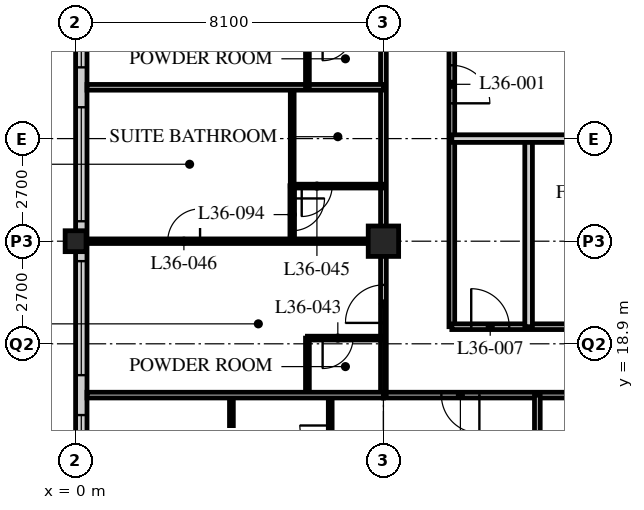
"""IFC4 building model, lengths in metres.
Left out: names, types, materials, properties, quantities, classifications, styles, units other than length and angle.
Written with IfcOpenShell. Run it as: python <this file> out.ifc"""

import sys

from ifc_helpers import new_model, si_unit, direction, frame, frame_2d, origin, origin_2d, place, context, subcontext, project, spatial, rectangle, hollow_rectangle, extrude, element, fill, save


model = new_model("IFC4")
c1 = context("Model", 3, precision=1e-05, world=origin(), true_north=direction((0.0, 1.0)))
c2 = subcontext(c1, "Body", "Model", "MODEL_VIEW")
j1 = project(units=[si_unit("LENGTHUNIT", "METRE"), si_unit("PLANEANGLEUNIT", "RADIAN")], contexts=[c1])
p1 = place(None, origin())
s1 = spatial("IfcSite", under=j1, at=p1, CompositionType="ELEMENT")
p2 = place(p1, origin())
s2 = spatial("IfcBuilding", under=s1, at=p2, CompositionType="ELEMENT")
p3 = place(p2, frame((0.0, 0.0, 140.8)))
s3 = spatial("IfcBuildingStorey", under=s2, at=p3, CompositionType="ELEMENT", Elevation=140.8)
p4 = place(p3, frame((0.0, 21.6, 0.0), z_axis=(0.0, 0.0, 1.0), x_axis=(1.0, 0.0, 0.0)))
e1 = element("IfcColumn", 1, at=p4, inside=s3, PredefinedType="COLUMN", context=c2, shape_type="SweptSolid", body=[
    extrude(hollow_rectangle(XDim=0.55, YDim=0.55, WallThickness=0.04, at=origin_2d()), origin(), (0.0, 0.0, 1.0), 3.4),
])
p5 = place(p3, frame((8.1, 21.6, 0.0), z_axis=(0.0, 0.0, 1.0), x_axis=(1.0, 0.0, 0.0)))
e2 = element("IfcColumn", 2, at=p5, inside=s3, PredefinedType="COLUMN", context=c2, shape_type="SweptSolid", body=[
    extrude(hollow_rectangle(XDim=0.8, YDim=0.8, WallThickness=0.08, at=origin_2d()), origin(), (0.0, 0.0, 1.0), 3.4),
])
p6 = place(p3, frame((0.15, 45.6, 0.0), z_axis=(0.0, 0.0, 1.0), x_axis=(0.0, -1.0, 0.0)))
e3 = element("IfcWall", 3, at=p6, inside=s3, PredefinedType="SOLIDWALL", context=c2, shape_type="SweptSolid", body=[
    extrude(rectangle(XDim=32.1, YDim=0.3, at=frame_2d((16.05, 0.0))), origin(), (0.0, 0.0, 1.0), 3.19),
])
p7 = place(p6, frame((0.225, 0.0, 0.9)))
e4 = element("IfcOpeningElement", 4, at=p7, cuts=e3, PredefinedType="OPENING", context=c2, shape_type="SweptSolid", body=[
    extrude(rectangle(XDim=3.0, YDim=2.0, at=frame_2d((1.5, 1.0))), frame((0.0, 0.16, 0.0), z_axis=(0.0, -1.0, 0.0), x_axis=(1.0, 0.0, 0.0)), (0.0, 0.0, 1.0), 0.32),
])
p8 = place(p6, frame((4.275, 0.0, 0.9)))
e5 = element("IfcOpeningElement", 5, at=p8, cuts=e3, PredefinedType="OPENING", context=c2, shape_type="SweptSolid", body=[
    extrude(rectangle(XDim=3.0, YDim=2.0, at=frame_2d((1.5, 1.0))), frame((0.0, 0.16, 0.0), z_axis=(0.0, -1.0, 0.0), x_axis=(1.0, 0.0, 0.0)), (0.0, 0.0, 1.0), 0.32),
])
p9 = place(p6, frame((8.325, 0.0, 0.9)))
e6 = element("IfcOpeningElement", 6, at=p9, cuts=e3, PredefinedType="OPENING", context=c2, shape_type="SweptSolid", body=[
    extrude(rectangle(XDim=3.0, YDim=2.0, at=frame_2d((1.5, 1.0))), frame((0.0, 0.16, 0.0), z_axis=(0.0, -1.0, 0.0), x_axis=(1.0, 0.0, 0.0)), (0.0, 0.0, 1.0), 0.32),
])
p10 = place(p6, frame((12.375, 0.0, 0.9)))
e7 = element("IfcOpeningElement", 7, at=p10, cuts=e3, PredefinedType="OPENING", context=c2, shape_type="SweptSolid", body=[
    extrude(rectangle(XDim=3.0, YDim=2.0, at=frame_2d((1.5, 1.0))), frame((0.0, 0.16, 0.0), z_axis=(0.0, -1.0, 0.0), x_axis=(1.0, 0.0, 0.0)), (0.0, 0.0, 1.0), 0.32),
])
p11 = place(p6, frame((16.425, 0.0, 0.9)))
e8 = element("IfcOpeningElement", 8, at=p11, cuts=e3, PredefinedType="OPENING", context=c2, shape_type="SweptSolid", body=[
    extrude(rectangle(XDim=3.0, YDim=2.0, at=frame_2d((1.5, 1.0))), frame((0.0, 0.16, 0.0), z_axis=(0.0, -1.0, 0.0), x_axis=(1.0, 0.0, 0.0)), (0.0, 0.0, 1.0), 0.32),
])
p12 = place(p6, frame((20.475, 0.0, 0.9)))
e9 = element("IfcOpeningElement", 9, at=p12, cuts=e3, PredefinedType="OPENING", context=c2, shape_type="SweptSolid", body=[
    extrude(rectangle(XDim=3.0, YDim=2.0, at=frame_2d((1.5, 1.0))), frame((0.0, 0.16, 0.0), z_axis=(0.0, -1.0, 0.0), x_axis=(1.0, 0.0, 0.0)), (0.0, 0.0, 1.0), 0.32),
])
p13 = place(p6, frame((24.525, 0.0, 0.9)))
e10 = element("IfcOpeningElement", 10, at=p13, cuts=e3, PredefinedType="OPENING", context=c2, shape_type="SweptSolid", body=[
    extrude(rectangle(XDim=3.0, YDim=2.0, at=frame_2d((1.5, 1.0))), frame((0.0, 0.16, 0.0), z_axis=(0.0, -1.0, 0.0), x_axis=(1.0, 0.0, 0.0)), (0.0, 0.0, 1.0), 0.32),
])
p14 = place(p6, frame((28.575, 0.0, 0.9)))
e11 = element("IfcOpeningElement", 11, at=p14, cuts=e3, PredefinedType="OPENING", context=c2, shape_type="SweptSolid", body=[
    extrude(rectangle(XDim=3.0, YDim=2.0, at=frame_2d((1.5, 1.0))), frame((0.0, 0.16, 0.0), z_axis=(0.0, -1.0, 0.0), x_axis=(1.0, 0.0, 0.0)), (0.0, 0.0, 1.0), 0.32),
])
p15 = place(p3, frame((8.1, 17.55, 0.0), z_axis=(0.0, 0.0, 1.0), x_axis=(1.0, 0.0, 0.0)))
e12 = element("IfcWall", 12, at=p15, inside=s3, PredefinedType="PARTITIONING", context=c2, shape_type="SweptSolid", body=[
    extrude(rectangle(XDim=36.45, YDim=0.15, at=frame_2d((18.225, 0.0))), origin(), (0.0, 0.0, 1.0), 3.19),
])
p16 = place(p15, frame((9.625, 0.0, 0.0)))
e13 = element("IfcOpeningElement", 13, at=p16, cuts=e12, PredefinedType="OPENING", context=c2, shape_type="SweptSolid", body=[
    extrude(rectangle(XDim=1.0, YDim=2.1, at=frame_2d((0.5, 1.05))), frame((0.0, 0.085, 0.0), z_axis=(0.0, -1.0, 0.0), x_axis=(1.0, 0.0, 0.0)), (0.0, 0.0, 1.0), 0.17),
])
p17 = place(p15, frame((18.1, 0.0, 0.0)))
e14 = element("IfcOpeningElement", 14, at=p17, cuts=e12, PredefinedType="OPENING", context=c2, shape_type="SweptSolid", body=[
    extrude(rectangle(XDim=1.0, YDim=2.1, at=frame_2d((0.5, 1.05))), frame((0.0, 0.085, 0.0), z_axis=(0.0, -1.0, 0.0), x_axis=(1.0, 0.0, 0.0)), (0.0, 0.0, 1.0), 0.17),
])
p18 = place(p15, frame((26.75, 0.0, 0.0)))
e15 = element("IfcOpeningElement", 15, at=p18, cuts=e12, PredefinedType="OPENING", context=c2, shape_type="SweptSolid", body=[
    extrude(rectangle(XDim=1.0, YDim=2.1, at=frame_2d((0.5, 1.05))), frame((0.0, 0.085, 0.0), z_axis=(0.0, -1.0, 0.0), x_axis=(1.0, 0.0, 0.0)), (0.0, 0.0, 1.0), 0.17),
])
p19 = place(p15, frame((30.8, 0.0, 0.0)))
e16 = element("IfcOpeningElement", 16, at=p19, cuts=e12, PredefinedType="OPENING", context=c2, shape_type="SweptSolid", body=[
    extrude(rectangle(XDim=1.0, YDim=2.1, at=frame_2d((0.5, 1.05))), frame((0.0, 0.085, 0.0), z_axis=(0.0, -1.0, 0.0), x_axis=(1.0, 0.0, 0.0)), (0.0, 0.0, 1.0), 0.17),
])
p20 = place(p15, frame((1.525, 0.0, 0.0)))
e17 = element("IfcOpeningElement", 17, at=p20, cuts=e12, PredefinedType="OPENING", context=c2, shape_type="SweptSolid", body=[
    extrude(rectangle(XDim=1.0, YDim=2.1, at=frame_2d((0.5, 1.05))), frame((0.0, 0.085, 0.0), z_axis=(0.0, -1.0, 0.0), x_axis=(1.0, 0.0, 0.0)), (0.0, 0.0, 1.0), 0.17),
])
p21 = place(p15, frame((33.925, 0.0, 0.0)))
e18 = element("IfcOpeningElement", 18, at=p21, cuts=e12, PredefinedType="OPENING", context=c2, shape_type="SweptSolid", body=[
    extrude(rectangle(XDim=1.0, YDim=2.1, at=frame_2d((0.5, 1.05))), frame((0.0, 0.085, 0.0), z_axis=(0.0, -1.0, 0.0), x_axis=(1.0, 0.0, 0.0)), (0.0, 0.0, 1.0), 0.17),
])
p22 = place(p3, frame((8.1, 17.55, 0.0), z_axis=(0.0, 0.0, 1.0), x_axis=(0.0, 1.0, 0.0)))
e19 = element("IfcWall", 19, at=p22, inside=s3, PredefinedType="PARTITIONING", context=c2, shape_type="SweptSolid", body=[
    extrude(rectangle(XDim=28.35, YDim=0.15, at=frame_2d((14.175, 0.0))), origin(), (0.0, 0.0, 1.0), 2.578),
])
p23 = place(p22, frame((1.9, 0.0, 0.0)))
e20 = element("IfcOpeningElement", 20, at=p23, cuts=e19, PredefinedType="OPENING", context=c2, shape_type="SweptSolid", body=[
    extrude(rectangle(XDim=1.0, YDim=2.1, at=frame_2d((0.5, 1.05))), frame((0.0, 0.085, 0.0), z_axis=(0.0, -1.0, 0.0), x_axis=(1.0, 0.0, 0.0)), (0.0, 0.0, 1.0), 0.17),
])
p24 = place(p22, frame((10.0, 0.0, 0.0)))
e21 = element("IfcOpeningElement", 21, at=p24, cuts=e19, PredefinedType="OPENING", context=c2, shape_type="SweptSolid", body=[
    extrude(rectangle(XDim=1.0, YDim=2.1, at=frame_2d((0.5, 1.05))), frame((0.0, 0.085, 0.0), z_axis=(0.0, -1.0, 0.0), x_axis=(1.0, 0.0, 0.0)), (0.0, 0.0, 1.0), 0.17),
])
p25 = place(p22, frame((18.1, 0.0, 0.0)))
e22 = element("IfcOpeningElement", 22, at=p25, cuts=e19, PredefinedType="OPENING", context=c2, shape_type="SweptSolid", body=[
    extrude(rectangle(XDim=1.0, YDim=2.1, at=frame_2d((0.5, 1.05))), frame((0.0, 0.085, 0.0), z_axis=(0.0, -1.0, 0.0), x_axis=(1.0, 0.0, 0.0)), (0.0, 0.0, 1.0), 0.17),
])
p26 = place(p22, frame((24.9, 0.0, 0.0)))
e23 = element("IfcOpeningElement", 23, at=p26, cuts=e19, PredefinedType="OPENING", context=c2, shape_type="SweptSolid", body=[
    extrude(rectangle(XDim=1.0, YDim=2.1, at=frame_2d((0.5, 1.05))), frame((0.0, 0.085, 0.0), z_axis=(0.0, -1.0, 0.0), x_axis=(1.0, 0.0, 0.0)), (0.0, 0.0, 1.0), 0.17),
])
p27 = place(p3, frame((9.9, 44.1, 0.0), z_axis=(0.0, 0.0, 1.0), x_axis=(0.0, -1.0, 0.0)))
e24 = element("IfcWall", 24, at=p27, inside=s3, PredefinedType="PARTITIONING", context=c2, shape_type="SweptSolid", body=[
    extrude(rectangle(XDim=24.75, YDim=0.15, at=frame_2d((12.375, 0.0))), origin(), (0.0, 0.0, 1.0), 3.19),
])
p28 = place(p27, frame((17.871, 0.0, 0.0)))
e25 = element("IfcOpeningElement", 25, at=p28, cuts=e24, PredefinedType="OPENING", context=c2, shape_type="SweptSolid", body=[
    extrude(rectangle(XDim=1.0, YDim=2.1, at=frame_2d((0.5, 1.05))), frame((0.0, 0.085, 0.0), z_axis=(0.0, -1.0, 0.0), x_axis=(1.0, 0.0, 0.0)), (0.0, 0.0, 1.0), 0.17),
])
p29 = place(p27, frame((13.821, 0.0, 0.0)))
e26 = element("IfcOpeningElement", 26, at=p29, cuts=e24, PredefinedType="OPENING", context=c2, shape_type="SweptSolid", body=[
    extrude(rectangle(XDim=1.0, YDim=2.1, at=frame_2d((0.5, 1.05))), frame((0.0, 0.085, 0.0), z_axis=(0.0, -1.0, 0.0), x_axis=(1.0, 0.0, 0.0)), (0.0, 0.0, 1.0), 0.17),
])
p30 = place(p27, frame((10.4, 0.0, 0.0)))
e27 = element("IfcOpeningElement", 27, at=p30, cuts=e24, PredefinedType="OPENING", context=c2, shape_type="SweptSolid", body=[
    extrude(rectangle(XDim=1.0, YDim=2.1, at=frame_2d((0.5, 1.05))), frame((0.0, 0.085, 0.0), z_axis=(0.0, -1.0, 0.0), x_axis=(1.0, 0.0, 0.0)), (0.0, 0.0, 1.0), 0.17),
])
p31 = place(p27, frame((6.35, 0.0, 0.0)))
e28 = element("IfcOpeningElement", 28, at=p31, cuts=e24, PredefinedType="OPENING", context=c2, shape_type="SweptSolid", body=[
    extrude(rectangle(XDim=1.0, YDim=2.1, at=frame_2d((0.5, 1.05))), frame((0.0, 0.085, 0.0), z_axis=(0.0, -1.0, 0.0), x_axis=(1.0, 0.0, 0.0)), (0.0, 0.0, 1.0), 0.17),
])
p32 = place(p3, frame((9.9, 19.35, 0.0), z_axis=(0.0, 0.0, 1.0), x_axis=(1.0, 0.0, 0.0)))
e29 = element("IfcWall", 29, at=p32, inside=s3, PredefinedType="PARTITIONING", context=c2, shape_type="SweptSolid", body=[
    extrude(rectangle(XDim=17.24, YDim=0.15, at=frame_2d((8.62, 0.0))), origin(), (0.0, 0.0, 1.0), 3.19),
])
p33 = place(p32, frame((0.51, 0.0, 0.0)))
e30 = element("IfcOpeningElement", 30, at=p33, cuts=e29, PredefinedType="OPENING", context=c2, shape_type="SweptSolid", body=[
    extrude(rectangle(XDim=1.0, YDim=2.1, at=frame_2d((0.5, 1.05))), frame((0.0, 0.085, 0.0), z_axis=(0.0, -1.0, 0.0), x_axis=(1.0, 0.0, 0.0)), (0.0, 0.0, 1.0), 0.17),
])
p34 = place(p32, frame((3.66, 0.0, 0.0)))
e31 = element("IfcOpeningElement", 31, at=p34, cuts=e29, PredefinedType="OPENING", context=c2, shape_type="SweptSolid", body=[
    extrude(rectangle(XDim=1.0, YDim=2.1, at=frame_2d((0.5, 1.05))), frame((0.0, 0.085, 0.0), z_axis=(0.0, -1.0, 0.0), x_axis=(1.0, 0.0, 0.0)), (0.0, 0.0, 1.0), 0.17),
])
p35 = place(p32, frame((7.618, 0.0, 0.0)))
e32 = element("IfcOpeningElement", 32, at=p35, cuts=e29, PredefinedType="OPENING", context=c2, shape_type="SweptSolid", body=[
    extrude(rectangle(XDim=1.0, YDim=2.1, at=frame_2d((0.5, 1.05))), frame((0.0, 0.085, 0.0), z_axis=(0.0, -1.0, 0.0), x_axis=(1.0, 0.0, 0.0)), (0.0, 0.0, 1.0), 0.17),
])
p36 = place(p32, frame((13.093, 0.0, 0.0)))
e33 = element("IfcOpeningElement", 33, at=p36, cuts=e29, PredefinedType="OPENING", context=c2, shape_type="SweptSolid", body=[
    extrude(rectangle(XDim=1.0, YDim=2.1, at=frame_2d((0.5, 1.05))), frame((0.0, 0.085, 0.0), z_axis=(0.0, -1.0, 0.0), x_axis=(1.0, 0.0, 0.0)), (0.0, 0.0, 1.0), 0.17),
])
p37 = place(p3, frame((11.92, 19.35, 0.0), z_axis=(0.0, 0.0, 1.0), x_axis=(0.0, 1.0, 0.0)))
e34 = element("IfcWall", 34, at=p37, inside=s3, PredefinedType="SOLIDWALL", context=c2, shape_type="SweptSolid", body=[
    extrude(rectangle(XDim=4.95, YDim=0.2, at=frame_2d((2.475, 0.0))), origin(), (0.0, 0.0, 1.0), 3.19),
])
p38 = place(p3, frame((9.9, 24.3, 0.0), z_axis=(0.0, 0.0, 1.0), x_axis=(1.0, 0.0, 0.0)))
e35 = element("IfcWall", 35, at=p38, inside=s3, PredefinedType="SOLIDWALL", context=c2, shape_type="SweptSolid", body=[
    extrude(rectangle(XDim=6.3, YDim=0.2, at=frame_2d((3.15, 0.0))), origin(), (0.0, 0.0, 1.0), 3.19),
])
p39 = place(p3, frame((6.1, 17.55, 0.0), z_axis=(0.0, 0.0, 1.0), x_axis=(0.0, 1.0, 0.0)))
e36 = element("IfcWall", 36, at=p39, inside=s3, PredefinedType="PARTITIONING", context=c2, shape_type="SweptSolid", body=[
    extrude(rectangle(XDim=1.5, YDim=0.1, at=frame_2d((0.75, 0.0))), origin(), (0.0, 0.0, 1.0), 3.19),
])
p40 = place(p3, frame((8.1, 19.05, 0.0), z_axis=(0.0, 0.0, 1.0), x_axis=(-1.0, 0.0, 0.0)))
e37 = element("IfcWall", 37, at=p40, inside=s3, PredefinedType="PARTITIONING", context=c2, shape_type="SweptSolid", body=[
    extrude(rectangle(XDim=2.0, YDim=0.1, at=frame_2d((1.0, 0.0))), origin(), (0.0, 0.0, 1.0), 3.19),
])
p41 = place(p40, frame((0.8, 0.0, 0.0)))
e38 = element("IfcOpeningElement", 38, at=p41, cuts=e37, PredefinedType="OPENING", context=c2, shape_type="SweptSolid", body=[
    extrude(rectangle(XDim=0.8, YDim=2.1, at=frame_2d((0.4, 1.05))), frame((0.0, 0.06, 0.0), z_axis=(0.0, -1.0, 0.0), x_axis=(1.0, 0.0, 0.0)), (0.0, 0.0, 1.0), 0.12),
])
p42 = place(p3, frame((5.7, 23.05, 0.0), z_axis=(0.0, 0.0, 1.0), x_axis=(0.0, 1.0, 0.0)))
e39 = element("IfcWall", 39, at=p42, inside=s3, PredefinedType="PARTITIONING", context=c2, shape_type="SweptSolid", body=[
    extrude(rectangle(XDim=2.6, YDim=0.1, at=frame_2d((1.3, 0.0))), origin(), (0.0, 0.0, 1.0), 3.19),
])
p43 = place(p3, frame((8.1, 23.05, 0.0), z_axis=(0.0, 0.0, 1.0), x_axis=(-1.0, 0.0, 0.0)))
e40 = element("IfcWall", 40, at=p43, inside=s3, PredefinedType="PARTITIONING", context=c2, shape_type="SweptSolid", body=[
    extrude(rectangle(XDim=2.4, YDim=0.1, at=frame_2d((1.2, 0.0))), origin(), (0.0, 0.0, 1.0), 3.19),
])
p44 = place(p43, frame((1.35, 0.0, 0.0)))
e41 = element("IfcOpeningElement", 41, at=p44, cuts=e40, PredefinedType="OPENING", context=c2, shape_type="SweptSolid", body=[
    extrude(rectangle(XDim=0.8, YDim=2.1, at=frame_2d((0.4, 1.05))), frame((0.0, 0.06, 0.0), z_axis=(0.0, -1.0, 0.0), x_axis=(1.0, 0.0, 0.0)), (0.0, 0.0, 1.0), 0.12),
])
p45 = place(p3, frame((8.1, 21.6, 0.0), z_axis=(0.0, 0.0, 1.0), x_axis=(-1.0, 0.0, 0.0)))
e42 = element("IfcWall", 42, at=p45, inside=s3, PredefinedType="PARTITIONING", context=c2, shape_type="SweptSolid", body=[
    extrude(rectangle(XDim=7.8, YDim=0.12, at=frame_2d((3.9, 0.0))), origin(), (0.0, 0.0, 1.0), 2.578),
])
p46 = place(p45, frame((4.825, 0.0, 0.0)))
e43 = element("IfcOpeningElement", 43, at=p46, cuts=e42, PredefinedType="OPENING", context=c2, shape_type="SweptSolid", body=[
    extrude(rectangle(XDim=0.85, YDim=2.1, at=frame_2d((0.425, 1.05))), frame((0.0, 0.07, 0.0), z_axis=(0.0, -1.0, 0.0), x_axis=(1.0, 0.0, 0.0)), (0.0, 0.0, 1.0), 0.14),
])
p47 = place(p3, frame((8.1, 25.65, 0.0), z_axis=(0.0, 0.0, 1.0), x_axis=(-1.0, 0.0, 0.0)))
e44 = element("IfcWall", 44, at=p47, inside=s3, PredefinedType="PARTITIONING", context=c2, shape_type="SweptSolid", body=[
    extrude(rectangle(XDim=7.8, YDim=0.15, at=frame_2d((3.9, 0.0))), origin(), (0.0, 0.0, 1.0), 3.19),
])
p48 = place(p3, frame((6.1, 25.65, 0.0), z_axis=(0.0, 0.0, 1.0), x_axis=(0.0, 1.0, 0.0)))
e45 = element("IfcWall", 45, at=p48, inside=s3, PredefinedType="PARTITIONING", context=c2, shape_type="SweptSolid", body=[
    extrude(rectangle(XDim=1.5, YDim=0.1, at=frame_2d((0.75, 0.0))), origin(), (0.0, 0.0, 1.0), 3.19),
])
p49 = place(p3, frame((6.7, 17.55, 0.0), z_axis=(0.0, 0.0, 1.0), x_axis=(0.0, -1.0, 0.0)))
e46 = element("IfcWall", 46, at=p49, inside=s3, PredefinedType="PARTITIONING", context=c2, shape_type="SweptSolid", body=[
    extrude(rectangle(XDim=2.4, YDim=0.1, at=frame_2d((1.2, 0.0))), origin(), (0.0, 0.0, 1.0), 3.19),
])
p50 = place(p49, frame((0.8, 0.0, 0.0)))
e47 = element("IfcOpeningElement", 47, at=p50, cuts=e46, PredefinedType="OPENING", context=c2, shape_type="SweptSolid", body=[
    extrude(rectangle(XDim=0.8, YDim=2.1, at=frame_2d((0.4, 1.05))), frame((0.0, 0.06, 0.0), z_axis=(0.0, -1.0, 0.0), x_axis=(1.0, 0.0, 0.0)), (0.0, 0.0, 1.0), 0.12),
])
p51 = place(p3, frame((4.1, 17.55, 0.0), z_axis=(0.0, 0.0, 1.0), x_axis=(0.0, -1.0, 0.0)))
e48 = element("IfcWall", 48, at=p51, inside=s3, PredefinedType="PARTITIONING", context=c2, shape_type="SweptSolid", body=[
    extrude(rectangle(XDim=2.4, YDim=0.1, at=frame_2d((1.2, 0.0))), origin(), (0.0, 0.0, 1.0), 3.19),
])
p52 = place(p3, frame((0.3, 17.55, 0.0), z_axis=(0.0, 0.0, 1.0), x_axis=(1.0, 0.0, 0.0)))
e49 = element("IfcWall", 49, at=p52, inside=s3, PredefinedType="PARTITIONING", context=c2, shape_type="SweptSolid", body=[
    extrude(rectangle(XDim=7.8, YDim=0.15, at=frame_2d((3.9, 0.0))), origin(), (0.0, 0.0, 1.0), 3.19),
])
p53 = place(p3, frame((12.15, 17.55, 0.0), z_axis=(0.0, 0.0, 1.0), x_axis=(0.0, -1.0, 0.0)))
e50 = element("IfcWall", 50, at=p53, inside=s3, PredefinedType="PARTITIONING", context=c2, shape_type="SweptSolid", body=[
    extrude(rectangle(XDim=11.85, YDim=0.15, at=frame_2d((5.925, 0.0))), origin(), (0.0, 0.0, 1.0), 3.19),
])
p54 = place(p3, frame((5.7, 21.6, 0.0), z_axis=(0.0, 0.0, 1.0), x_axis=(0.0, 1.0, 0.0)))
e51 = element("IfcWall", 51, at=p54, inside=s3, PredefinedType="PARTITIONING", context=c2, shape_type="SweptSolid", body=[
    extrude(rectangle(XDim=1.46, YDim=0.12, at=frame_2d((0.73, 0.0))), origin(), (0.0, 0.0, 1.0), 3.19),
])
p55 = place(p54, frame((0.275, 0.0, 0.0)))
e52 = element("IfcOpeningElement", 52, at=p55, cuts=e51, PredefinedType="OPENING", context=c2, shape_type="SweptSolid", body=[
    extrude(rectangle(XDim=0.85, YDim=2.1, at=frame_2d((0.425, 1.05))), frame((0.0, 0.07, 0.0), z_axis=(0.0, -1.0, 0.0), x_axis=(1.0, 0.0, 0.0)), (0.0, 0.0, 1.0), 0.14),
])
p56 = place(p11, origin())
e53 = element("IfcWindow", 53, at=p56, inside=s3, PartitioningType="SINGLE_PANEL", PredefinedType="WINDOW", context=c2, shape_type="SweptSolid", body=[
    extrude(rectangle(XDim=3.0, YDim=2.0, at=frame_2d((1.5, 1.0))), frame((0.0, 0.03, 0.0), z_axis=(0.0, -1.0, 0.0), x_axis=(1.0, 0.0, 0.0)), (0.0, 0.0, 1.0), 0.06),
])
fill(e8, e53)
p57 = place(p12, origin())
e54 = element("IfcWindow", 54, at=p57, inside=s3, PartitioningType="SINGLE_PANEL", PredefinedType="WINDOW", context=c2, shape_type="SweptSolid", body=[
    extrude(rectangle(XDim=3.0, YDim=2.0, at=frame_2d((1.5, 1.0))), frame((0.0, 0.03, 0.0), z_axis=(0.0, -1.0, 0.0), x_axis=(1.0, 0.0, 0.0)), (0.0, 0.0, 1.0), 0.06),
])
fill(e9, e54)
p58 = place(p13, origin())
e55 = element("IfcWindow", 55, at=p58, inside=s3, PartitioningType="SINGLE_PANEL", PredefinedType="WINDOW", context=c2, shape_type="SweptSolid", body=[
    extrude(rectangle(XDim=3.0, YDim=2.0, at=frame_2d((1.5, 1.0))), frame((0.0, 0.03, 0.0), z_axis=(0.0, -1.0, 0.0), x_axis=(1.0, 0.0, 0.0)), (0.0, 0.0, 1.0), 0.06),
])
fill(e10, e55)
p59 = place(p14, origin())
e56 = element("IfcWindow", 56, at=p59, inside=s3, PartitioningType="SINGLE_PANEL", PredefinedType="WINDOW", context=c2, shape_type="SweptSolid", body=[
    extrude(rectangle(XDim=3.0, YDim=2.0, at=frame_2d((1.5, 1.0))), frame((0.0, 0.03, 0.0), z_axis=(0.0, -1.0, 0.0), x_axis=(1.0, 0.0, 0.0)), (0.0, 0.0, 1.0), 0.06),
])
fill(e11, e56)
p60 = place(p28, origin())
e57 = element("IfcDoor", 57, at=p60, inside=s3, OperationType="SINGLE_SWING_RIGHT", PredefinedType="DOOR", context=c2, shape_type="SweptSolid", body=[
    extrude(rectangle(XDim=1.0, YDim=2.1, at=frame_2d((0.5, 1.05))), frame((0.0, 0.025, 0.0), z_axis=(0.0, -1.0, 0.0), x_axis=(1.0, 0.0, 0.0)), (0.0, 0.0, 1.0), 0.05),
])
fill(e25, e57)
p61 = place(p33, origin())
e58 = element("IfcDoor", 58, at=p61, inside=s3, OperationType="SINGLE_SWING_LEFT", PredefinedType="DOOR", context=c2, shape_type="SweptSolid", body=[
    extrude(rectangle(XDim=1.0, YDim=2.1, at=frame_2d((0.5, 1.05))), frame((0.0, 0.025, 0.0), z_axis=(0.0, -1.0, 0.0), x_axis=(1.0, 0.0, 0.0)), (0.0, 0.0, 1.0), 0.05),
])
fill(e30, e58)
p62 = place(p41, origin())
e59 = element("IfcDoor", 59, at=p62, inside=s3, OperationType="SINGLE_SWING_RIGHT", PredefinedType="DOOR", context=c2, shape_type="SweptSolid", body=[
    extrude(rectangle(XDim=0.8, YDim=2.1, at=frame_2d((0.4, 1.05))), frame((0.0, 0.025, 0.0), z_axis=(0.0, -1.0, 0.0), x_axis=(1.0, 0.0, 0.0)), (0.0, 0.0, 1.0), 0.05),
])
fill(e38, e59)
p63 = place(p23, origin())
e60 = element("IfcDoor", 60, at=p63, inside=s3, OperationType="SINGLE_SWING_LEFT", PredefinedType="DOOR", context=c2, shape_type="SweptSolid", body=[
    extrude(rectangle(XDim=1.0, YDim=2.1, at=frame_2d((0.5, 1.05))), frame((0.0, 0.025, 0.0), z_axis=(0.0, -1.0, 0.0), x_axis=(1.0, 0.0, 0.0)), (0.0, 0.0, 1.0), 0.05),
])
fill(e20, e60)
p64 = place(p44, origin())
e61 = element("IfcDoor", 61, at=p64, inside=s3, OperationType="SINGLE_SWING_RIGHT", PredefinedType="DOOR", context=c2, shape_type="SweptSolid", body=[
    extrude(rectangle(XDim=0.8, YDim=2.1, at=frame_2d((0.4, 1.05))), frame((0.0, 0.025, 0.0), z_axis=(0.0, -1.0, 0.0), x_axis=(1.0, 0.0, 0.0)), (0.0, 0.0, 1.0), 0.05),
])
fill(e41, e61)
p65 = place(p46, origin())
e62 = element("IfcDoor", 62, at=p65, inside=s3, OperationType="SINGLE_SWING_RIGHT", PredefinedType="DOOR", context=c2, shape_type="SweptSolid", body=[
    extrude(rectangle(XDim=0.85, YDim=2.1, at=frame_2d((0.425, 1.05))), frame((0.0, 0.025, 0.0), z_axis=(0.0, -1.0, 0.0), x_axis=(1.0, 0.0, 0.0)), (0.0, 0.0, 1.0), 0.05),
])
fill(e43, e62)
p66 = place(p20, origin())
e63 = element("IfcDoor", 63, at=p66, inside=s3, OperationType="SINGLE_SWING_LEFT", PredefinedType="DOOR", context=c2, shape_type="SweptSolid", body=[
    extrude(rectangle(XDim=1.0, YDim=2.1, at=frame_2d((0.5, 1.05))), frame((0.0, 0.025, 0.0), z_axis=(0.0, -1.0, 0.0), x_axis=(1.0, 0.0, 0.0)), (0.0, 0.0, 1.0), 0.05),
])
fill(e17, e63)
p67 = place(p50, origin())
e64 = element("IfcDoor", 64, at=p67, inside=s3, OperationType="SINGLE_SWING_RIGHT", PredefinedType="DOOR", context=c2, shape_type="SweptSolid", body=[
    extrude(rectangle(XDim=0.8, YDim=2.1, at=frame_2d((0.4, 1.05))), frame((0.0, 0.025, 0.0), z_axis=(0.0, -1.0, 0.0), x_axis=(1.0, 0.0, 0.0)), (0.0, 0.0, 1.0), 0.05),
])
fill(e47, e64)
p68 = place(p55, origin())
e65 = element("IfcDoor", 65, at=p68, inside=s3, OperationType="SINGLE_SWING_LEFT", PredefinedType="DOOR", context=c2, shape_type="SweptSolid", body=[
    extrude(rectangle(XDim=0.85, YDim=2.1, at=frame_2d((0.425, 1.05))), frame((0.0, 0.025, 0.0), z_axis=(0.0, -1.0, 0.0), x_axis=(1.0, 0.0, 0.0)), (0.0, 0.0, 1.0), 0.05),
])
fill(e52, e65)
save(model, sys.argv[1])
